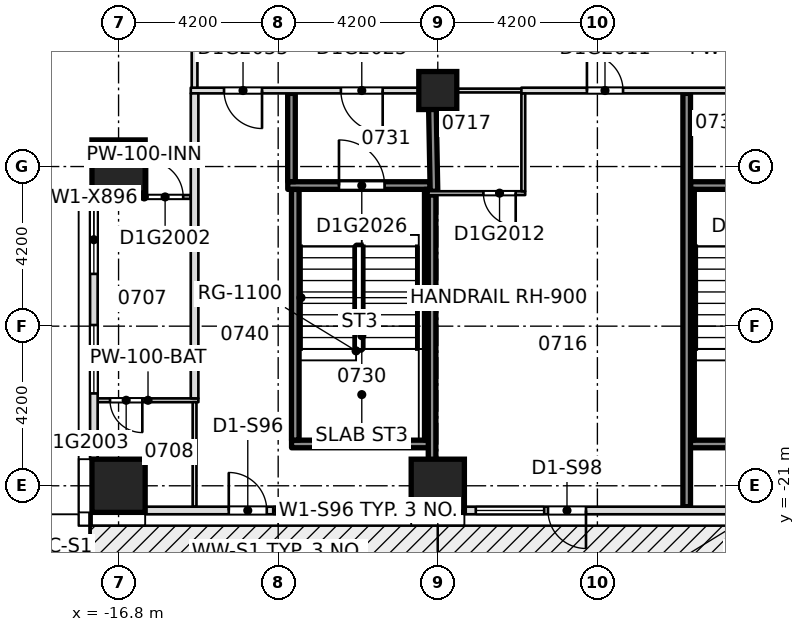
"""IFC4 building model, lengths in metres.
Left out: names, types, materials, properties, quantities, classifications, styles, units other than length and angle.
Written with IfcOpenShell. Run it as: python <this file> out.ifc"""

import sys

from ifc_helpers import new_model, si_unit, direction, frame, frame_2d, origin, origin_2d, place, context, subcontext, project, spatial, rectangle, extrude, element, fill, save


model = new_model("IFC4")
c1 = context("Model", 3, precision=1e-05, world=origin(), true_north=direction((0.0, 1.0)))
c2 = subcontext(c1, "Body", "Model", "MODEL_VIEW")
j1 = project(units=[si_unit("LENGTHUNIT", "METRE"), si_unit("PLANEANGLEUNIT", "RADIAN")], contexts=[c1])
p1 = place(None, origin())
s1 = spatial("IfcSite", under=j1, at=p1, CompositionType="ELEMENT")
p2 = place(p1, origin())
s2 = spatial("IfcBuilding", under=s1, at=p2, CompositionType="ELEMENT")
p3 = place(p2, frame((0.0, 0.0, 37.95)))
s3 = spatial("IfcBuildingStorey", under=s2, at=p3, CompositionType="ELEMENT", Elevation=37.95)
for number, where, z_axis, x_axis in (
    (1, (-16.8, -21.0, -0.32), (0.0, 0.0, 1.0), (1.0, 0.0, 0.0)),
    (2, (-8.4, -21.0, -0.32), (0.0, 0.0, 1.0), (1.0, 0.0, 0.0)),
    (3, (-16.8, -12.6, -0.32), (0.0, 0.0, 1.0), (1.0, 0.0, 0.0)),
):
    element("IfcColumn", number, at=place(p3, frame(where, z_axis=z_axis, x_axis=x_axis)), inside=s3, PredefinedType="COLUMN", context=c2, shape_type="SweptSolid", body=[
        extrude(rectangle(XDim=1.4, YDim=1.4, at=origin_2d()), origin(), (0.0, 0.0, 1.0), 3.45),
    ])
p4 = place(p3, frame((-8.4, -10.6, -0.32), z_axis=(0.0, 0.0, 1.0), x_axis=(1.0, 0.0, 0.0)))
e4 = element("IfcColumn", 4, at=p4, inside=s3, PredefinedType="COLUMN", context=c2, shape_type="SweptSolid", body=[
    extrude(rectangle(XDim=1.0, YDim=1.0, at=origin_2d()), origin(), (0.0, 0.0, 1.0), 3.45),
])
p5 = place(p3, frame((-12.248, -19.9, 0.0), z_axis=(0.0, 0.0, 1.0), x_axis=(1.0, 0.0, 0.0)))
e5 = element("IfcWall", 5, at=p5, inside=s3, PredefinedType="SOLIDWALL", context=c2, shape_type="SweptSolid", body=[
    extrude(rectangle(XDim=3.696, YDim=0.2, at=frame_2d((1.848, 0.0))), origin(), (0.0, 0.0, 1.0), 3.13),
])
p6 = place(p3, frame((-1.848, -19.9, 0.0), z_axis=(0.0, 0.0, 1.0), x_axis=(1.0, 0.0, 0.0)))
e6 = element("IfcWall", 6, at=p6, inside=s3, PredefinedType="SOLIDWALL", context=c2, shape_type="SweptSolid", body=[
    extrude(rectangle(XDim=3.696, YDim=0.2, at=frame_2d((1.848, 0.0))), origin(), (0.0, 0.0, 1.0), 3.13),
])
p7 = place(p3, frame((-17.35, -18.75, 0.0), z_axis=(0.0, 0.0, 1.0), x_axis=(1.0, 0.0, 0.0)))
e7 = element("IfcWall", 7, at=p7, inside=s3, PredefinedType="PARTITIONING", context=c2, shape_type="SweptSolid", body=[
    extrude(rectangle(XDim=2.65, YDim=0.1, at=frame_2d((1.325, 0.0))), origin(), (0.0, 0.0, 1.0), 3.13),
])
p8 = place(p7, frame((0.325, 0.0, 0.0)))
e8 = element("IfcOpeningElement", 8, at=p8, cuts=e7, PredefinedType="OPENING", context=c2, shape_type="SweptSolid", body=[
    extrude(rectangle(XDim=0.85, YDim=2.1, at=frame_2d((0.425, 1.05))), frame((0.0, 0.06, 0.0), z_axis=(0.0, -1.0, 0.0), x_axis=(1.0, 0.0, 0.0)), (0.0, 0.0, 1.0), 0.12),
])
p9 = place(p3, frame((-17.35, -13.4, 0.0), z_axis=(0.0, 0.0, 1.0), x_axis=(1.0, 0.0, 0.0)))
e9 = element("IfcWall", 9, at=p9, inside=s3, PredefinedType="PARTITIONING", context=c2, shape_type="SweptSolid", body=[
    extrude(rectangle(XDim=2.45, YDim=0.1, at=frame_2d((1.225, 0.0))), origin(), (0.0, 0.0, 1.0), 3.13),
])
p10 = place(p9, frame((1.3, 0.0, 0.0)))
e10 = element("IfcOpeningElement", 10, at=p10, cuts=e9, PredefinedType="OPENING", context=c2, shape_type="SweptSolid", body=[
    extrude(rectangle(XDim=0.95, YDim=2.1, at=frame_2d((0.475, 1.05))), frame((0.0, 0.06, 0.0), z_axis=(0.0, -1.0, 0.0), x_axis=(1.0, 0.0, 0.0)), (0.0, 0.0, 1.0), 0.12),
])
p11 = place(p3, frame((-8.65, -13.3, 0.0), z_axis=(0.0, 0.0, 1.0), x_axis=(1.0, 0.0, 0.0)))
e11 = element("IfcWall", 11, at=p11, inside=s3, PredefinedType="PARTITIONING", context=c2, shape_type="SweptSolid", body=[
    extrude(rectangle(XDim=2.55, YDim=0.1, at=frame_2d((1.275, 0.0))), origin(), (0.0, 0.0, 1.0), 3.13),
])
p12 = place(p11, frame((1.45, 0.0, 0.0)))
e12 = element("IfcOpeningElement", 12, at=p12, cuts=e11, PredefinedType="OPENING", context=c2, shape_type="SweptSolid", body=[
    extrude(rectangle(XDim=0.85, YDim=2.1, at=frame_2d((0.425, 1.05))), frame((0.0, 0.06, 0.0), z_axis=(0.0, -1.0, 0.0), x_axis=(1.0, 0.0, 0.0)), (0.0, 0.0, 1.0), 0.12),
])
p13 = place(p3, frame((-12.348, -13.1, 0.0), z_axis=(0.0, 0.0, 1.0), x_axis=(1.0, 0.0, 0.0)))
e13 = element("IfcWall", 13, at=p13, inside=s3, PredefinedType="SOLIDWALL", context=c2, shape_type="SweptSolid", body=[
    extrude(rectangle(XDim=3.746, YDim=0.2, at=frame_2d((1.873, 0.0))), origin(), (0.0, 0.0, 1.0), 3.13),
])
p14 = place(p13, frame((1.348, 0.0, 0.0)))
e14 = element("IfcOpeningElement", 14, at=p14, cuts=e13, PredefinedType="OPENING", context=c2, shape_type="SweptSolid", body=[
    extrude(rectangle(XDim=1.2, YDim=2.1, at=frame_2d((0.6, 1.05))), frame((0.0, 0.11, 0.0), z_axis=(0.0, -1.0, 0.0), x_axis=(1.0, 0.0, 0.0)), (0.0, 0.0, 1.0), 0.22),
])
p15 = place(p3, frame((-1.748, -13.1, 0.0), z_axis=(0.0, 0.0, 1.0), x_axis=(1.0, 0.0, 0.0)))
e15 = element("IfcWall", 15, at=p15, inside=s3, PredefinedType="SOLIDWALL", context=c2, shape_type="SweptSolid", body=[
    extrude(rectangle(XDim=3.696, YDim=0.2, at=frame_2d((1.848, 0.0))), origin(), (0.0, 0.0, 1.0), 3.13),
])
p16 = place(p15, frame((1.148, 0.0, 0.0)))
e16 = element("IfcOpeningElement", 16, at=p16, cuts=e15, PredefinedType="OPENING", context=c2, shape_type="SweptSolid", body=[
    extrude(rectangle(XDim=1.2, YDim=2.1, at=frame_2d((0.6, 1.05))), frame((0.0, 0.11, 0.0), z_axis=(0.0, -1.0, 0.0), x_axis=(1.0, 0.0, 0.0)), (0.0, 0.0, 1.0), 0.22),
])
p17 = place(p3, frame((-14.9, -10.6, 0.0), z_axis=(0.0, 0.0, 1.0), x_axis=(1.0, 0.0, 0.0)))
e17 = element("IfcWall", 17, at=p17, inside=s3, PredefinedType="PARTITIONING", context=c2, shape_type="SweptSolid", body=[
    extrude(rectangle(XDim=6.4, YDim=0.15, at=frame_2d((3.2, 0.0))), origin(), (0.0, 0.0, 1.0), 3.13),
])
p18 = place(p17, frame((3.95, 0.0, 0.0)))
e18 = element("IfcOpeningElement", 18, at=p18, cuts=e17, PredefinedType="OPENING", context=c2, shape_type="SweptSolid", body=[
    extrude(rectangle(XDim=1.1, YDim=2.1, at=frame_2d((0.55, 1.05))), frame((0.0, 0.085, 0.0), z_axis=(0.0, -1.0, 0.0), x_axis=(1.0, 0.0, 0.0)), (0.0, 0.0, 1.0), 0.17),
])
p19 = place(p17, frame((0.875, 0.0, 0.0)))
e19 = element("IfcOpeningElement", 19, at=p19, cuts=e17, PredefinedType="OPENING", context=c2, shape_type="SweptSolid", body=[
    extrude(rectangle(XDim=1.0, YDim=2.1, at=frame_2d((0.5, 1.05))), frame((0.0, 0.085, 0.0), z_axis=(0.0, -1.0, 0.0), x_axis=(1.0, 0.0, 0.0)), (0.0, 0.0, 1.0), 0.17),
])
p20 = place(p3, frame((-8.6, -10.6, 0.0), z_axis=(0.0, 0.0, 1.0), x_axis=(1.0, 0.0, 0.0)))
e20 = element("IfcWall", 20, at=p20, inside=s3, PredefinedType="PARTITIONING", context=c2, shape_type="SweptSolid", body=[
    extrude(rectangle(XDim=2.5, YDim=0.1, at=frame_2d((1.25, 0.0))), origin(), (0.0, 0.0, 1.0), 3.13),
])
p21 = place(p3, frame((-6.2, -10.6, 0.0), z_axis=(0.0, 0.0, 1.0), x_axis=(1.0, 0.0, 0.0)))
e21 = element("IfcWall", 21, at=p21, inside=s3, PredefinedType="PARTITIONING", context=c2, shape_type="SweptSolid", body=[
    extrude(rectangle(XDim=12.1, YDim=0.15, at=frame_2d((6.05, 0.0))), origin(), (0.0, 0.0, 1.0), 3.13),
])
p22 = place(p21, frame((1.725, 0.0, 0.0)))
e22 = element("IfcOpeningElement", 22, at=p22, cuts=e21, PredefinedType="OPENING", context=c2, shape_type="SweptSolid", body=[
    extrude(rectangle(XDim=0.95, YDim=2.1, at=frame_2d((0.475, 1.05))), frame((0.0, 0.085, 0.0), z_axis=(0.0, -1.0, 0.0), x_axis=(1.0, 0.0, 0.0)), (0.0, 0.0, 1.0), 0.17),
])
p23 = place(p21, frame((9.575, 0.0, 0.0)))
e23 = element("IfcOpeningElement", 23, at=p23, cuts=e21, PredefinedType="OPENING", context=c2, shape_type="SweptSolid", body=[
    extrude(rectangle(XDim=0.95, YDim=2.1, at=frame_2d((0.475, 1.05))), frame((0.0, 0.085, 0.0), z_axis=(0.0, -1.0, 0.0), x_axis=(1.0, 0.0, 0.0)), (0.0, 0.0, 1.0), 0.17),
])
p24 = place(p21, frame((6.8, 0.0, 0.0)))
e24 = element("IfcOpeningElement", 24, at=p24, cuts=e21, PredefinedType="OPENING", context=c2, shape_type="SweptSolid", body=[
    extrude(rectangle(XDim=1.1, YDim=2.1, at=frame_2d((0.55, 1.05))), frame((0.0, 0.085, 0.0), z_axis=(0.0, -1.0, 0.0), x_axis=(1.0, 0.0, 0.0)), (0.0, 0.0, 1.0), 0.17),
])
p25 = place(p3, frame((-14.8, -21.55, 0.0), z_axis=(0.0, 0.0, 1.0), x_axis=(0.0, 1.0, 0.0)))
e25 = element("IfcWall", 25, at=p25, inside=s3, PredefinedType="PARTITIONING", context=c2, shape_type="SweptSolid", body=[
    extrude(rectangle(XDim=2.75, YDim=0.1, at=frame_2d((1.375, 0.0))), origin(), (0.0, 0.0, 1.0), 3.13),
])
p26 = place(p3, frame((-14.8, -18.7, 0.0), z_axis=(0.0, 0.0, 1.0), x_axis=(0.0, 1.0, 0.0)))
e26 = element("IfcWall", 26, at=p26, inside=s3, PredefinedType="PARTITIONING", context=c2, shape_type="SweptSolid", body=[
    extrude(rectangle(XDim=8.025, YDim=0.2, at=frame_2d((4.012, 0.0))), origin(), (0.0, 0.0, 1.0), 3.13),
])
p27 = place(p3, frame((-14.8, -10.525, 0.0), z_axis=(0.0, 0.0, 1.0), x_axis=(0.0, 1.0, 0.0)))
e27 = element("IfcWall", 27, at=p27, inside=s3, PredefinedType="PARTITIONING", context=c2, shape_type="SweptSolid", body=[
    extrude(rectangle(XDim=2.05, YDim=0.15, at=frame_2d((1.025, 0.0))), origin(), (0.0, 0.0, 1.0), 3.13),
])
p28 = place(p3, frame((-12.25, -12.998, 0.0), z_axis=(0.0, 0.0, 1.0), x_axis=(0.0, 1.0, 0.0)))
e28 = element("IfcWall", 28, at=p28, inside=s3, PredefinedType="SOLIDWALL", context=c2, shape_type="SweptSolid", body=[
    extrude(rectangle(XDim=2.323, YDim=0.2, at=frame_2d((1.162, 0.0))), origin(), (0.0, 0.0, 1.0), 3.13),
])
for number, where, z_axis, x_axis in (
    (29, (-12.15, -19.798, 0.0), (0.0, 0.0, 1.0), (0.0, 1.0, 0.0)),
    (30, (-8.65, -19.798, 0.0), (0.0, 0.0, 1.0), (0.0, 1.0, 0.0)),
):
    element("IfcWall", number, at=place(p3, frame(where, z_axis=z_axis, x_axis=x_axis)), inside=s3, PredefinedType="SOLIDWALL", context=c2, shape_type="SweptSolid", body=[
        extrude(rectangle(XDim=6.596, YDim=0.2, at=frame_2d((3.298, 0.0))), origin(), (0.0, 0.0, 1.0), 3.13),
    ])
p29 = place(p3, frame((-8.5, -13.25, 0.0), z_axis=(0.0, 0.0, 1.0), x_axis=(-0.019062755699, 0.999818289163, 0.0)))
e31 = element("IfcWall", 31, at=p29, inside=s3, PredefinedType="SOLIDWALL", context=c2, shape_type="SweptSolid", body=[
    extrude(rectangle(XDim=2.625, YDim=0.2, at=frame_2d((1.313, 0.0))), origin(), (0.0, 0.0, 1.0), 3.13),
])
p30 = place(p3, frame((-6.15, -13.25, 0.0), z_axis=(0.0, 0.0, 1.0), x_axis=(0.0, 1.0, 0.0)))
e32 = element("IfcWall", 32, at=p30, inside=s3, PredefinedType="PARTITIONING", context=c2, shape_type="SweptSolid", body=[
    extrude(rectangle(XDim=2.575, YDim=0.1, at=frame_2d((1.288, 0.0))), origin(), (0.0, 0.0, 1.0), 3.13),
])
p31 = place(p3, frame((-1.75, -19.798, 0.0), z_axis=(0.0, 0.0, 1.0), x_axis=(0.0, 1.0, 0.0)))
e33 = element("IfcWall", 33, at=p31, inside=s3, PredefinedType="SOLIDWALL", context=c2, shape_type="SweptSolid", body=[
    extrude(rectangle(XDim=6.596, YDim=0.2, at=frame_2d((3.298, 0.0))), origin(), (0.0, 0.0, 1.0), 3.13),
])
p32 = place(p3, frame((-16.1, -21.65, 0.0), z_axis=(0.0, 0.0, 1.0), x_axis=(1.0, 0.0, 0.0)))
e34 = element("IfcWall", 34, at=p32, inside=s3, PredefinedType="STANDARD", context=c2, shape_type="SweptSolid", body=[
    extrude(rectangle(XDim=7.0, YDim=0.2, at=frame_2d((3.5, 0.0))), origin(), (0.0, 0.0, 1.0), 3.13),
])
p33 = place(p32, frame((3.37, 0.0, 0.2)))
e35 = element("IfcOpeningElement", 35, at=p33, cuts=e34, PredefinedType="OPENING", context=c2, shape_type="SweptSolid", body=[
    extrude(rectangle(XDim=1.8, YDim=2.65, at=frame_2d((0.9, 1.325))), frame((0.0, 0.11, 0.0), z_axis=(0.0, -1.0, 0.0), x_axis=(1.0, 0.0, 0.0)), (0.0, 0.0, 1.0), 0.22),
])
p34 = place(p32, frame((2.2, 0.0, 0.0)))
e36 = element("IfcOpeningElement", 36, at=p34, cuts=e34, PredefinedType="OPENING", context=c2, shape_type="SweptSolid", body=[
    extrude(rectangle(XDim=1.0, YDim=2.4, at=frame_2d((0.5, 1.2))), frame((0.0, 0.11, 0.0), z_axis=(0.0, -1.0, 0.0), x_axis=(1.0, 0.0, 0.0)), (0.0, 0.0, 1.0), 0.22),
])
p35 = place(p3, frame((-7.7, -21.65, 0.0), z_axis=(0.0, 0.0, 1.0), x_axis=(1.0, 0.0, 0.0)))
e37 = element("IfcWall", 37, at=p35, inside=s3, PredefinedType="STANDARD", context=c2, shape_type="SweptSolid", body=[
    extrude(rectangle(XDim=7.0, YDim=0.2, at=frame_2d((3.5, 0.0))), origin(), (0.0, 0.0, 1.0), 3.13),
])
p36 = place(p35, frame((0.3, 0.0, 0.2)))
e38 = element("IfcOpeningElement", 38, at=p36, cuts=e37, PredefinedType="OPENING", context=c2, shape_type="SweptSolid", body=[
    extrude(rectangle(XDim=1.8, YDim=2.65, at=frame_2d((0.9, 1.325))), frame((0.0, 0.11, 0.0), z_axis=(0.0, -1.0, 0.0), x_axis=(1.0, 0.0, 0.0)), (0.0, 0.0, 1.0), 0.22),
])
p37 = place(p35, frame((2.2, 0.0, 0.0)))
e39 = element("IfcOpeningElement", 39, at=p37, cuts=e37, PredefinedType="OPENING", context=c2, shape_type="SweptSolid", body=[
    extrude(rectangle(XDim=1.0, YDim=2.4, at=frame_2d((0.5, 1.2))), frame((0.0, 0.11, 0.0), z_axis=(0.0, -1.0, 0.0), x_axis=(1.0, 0.0, 0.0)), (0.0, 0.0, 1.0), 0.22),
])
p38 = place(p3, frame((-24.5, -13.25, 0.0), z_axis=(0.0, 0.0, 1.0), x_axis=(1.0, 0.0, 0.0)))
e40 = element("IfcWall", 40, at=p38, inside=s3, PredefinedType="STANDARD", context=c2, shape_type="SweptSolid", body=[
    extrude(rectangle(XDim=6.95, YDim=0.2, at=frame_2d((3.475, 0.0))), origin(), (0.0, 0.0, 1.0), 3.13),
])
p39 = place(p3, frame((-17.45, -13.35, 0.0), z_axis=(0.0, 0.0, 1.0), x_axis=(0.0, -1.0, 0.0)))
e41 = element("IfcWall", 41, at=p39, inside=s3, PredefinedType="STANDARD", context=c2, shape_type="SweptSolid", body=[
    extrude(rectangle(XDim=6.95, YDim=0.2, at=frame_2d((3.475, 0.0))), origin(), (0.0, 0.0, 1.0), 3.13),
])
p40 = place(p39, frame((3.42, 0.0, 0.2)))
e42 = element("IfcOpeningElement", 42, at=p40, cuts=e41, PredefinedType="OPENING", context=c2, shape_type="SweptSolid", body=[
    extrude(rectangle(XDim=1.8, YDim=2.65, at=frame_2d((0.9, 1.325))), frame((0.0, 0.11, 0.0), z_axis=(0.0, -1.0, 0.0), x_axis=(1.0, 0.0, 0.0)), (0.0, 0.0, 1.0), 0.22),
])
p41 = place(p39, frame((0.275, 0.0, 0.2)))
e43 = element("IfcOpeningElement", 43, at=p41, cuts=e41, PredefinedType="OPENING", context=c2, shape_type="SweptSolid", body=[
    extrude(rectangle(XDim=1.8, YDim=2.65, at=frame_2d((0.9, 1.325))), frame((0.0, 0.11, 0.0), z_axis=(0.0, -1.0, 0.0), x_axis=(1.0, 0.0, 0.0)), (0.0, 0.0, 1.0), 0.22),
])
p42 = place(p3, frame((-1.85, -21.55, 0.0), z_axis=(0.0, 0.0, 1.0), x_axis=(0.0, 1.0, 0.0)))
e44 = element("IfcWall", 44, at=p42, inside=s3, PredefinedType="SOLIDWALL", context=c2, shape_type="SweptSolid", body=[
    extrude(rectangle(XDim=10.875, YDim=0.2, at=frame_2d((5.438, 0.0))), origin(), (0.0, 0.0, 1.0), 3.13),
])
p43 = place(p3, frame((-8.55, -21.55, 0.0), z_axis=(0.0, 0.0, 1.0), x_axis=(0.0, 1.0, 0.0)))
e45 = element("IfcWall", 45, at=p43, inside=s3, PredefinedType="SOLIDWALL", context=c2, shape_type="SweptSolid", body=[
    extrude(rectangle(XDim=8.2, YDim=0.2, at=frame_2d((4.1, 0.0))), origin(), (0.0, 0.0, 1.0), 3.13),
])
p44 = place(p10, origin())
e46 = element("IfcDoor", 46, at=p44, inside=s3, OperationType="SINGLE_SWING_RIGHT", PredefinedType="DOOR", context=c2, shape_type="SweptSolid", body=[
    extrude(rectangle(XDim=0.95, YDim=2.1, at=frame_2d((0.475, 1.05))), frame((0.0, 0.025, 0.0), z_axis=(0.0, -1.0, 0.0), x_axis=(1.0, 0.0, 0.0)), (0.0, 0.0, 1.0), 0.05),
])
fill(e10, e46)
p45 = place(p8, origin())
e47 = element("IfcDoor", 47, at=p45, inside=s3, OperationType="SINGLE_SWING_RIGHT", PredefinedType="DOOR", context=c2, shape_type="SweptSolid", body=[
    extrude(rectangle(XDim=0.85, YDim=2.1, at=frame_2d((0.425, 1.05))), frame((0.0, 0.025, 0.0), z_axis=(0.0, -1.0, 0.0), x_axis=(1.0, 0.0, 0.0)), (0.0, 0.0, 1.0), 0.05),
])
fill(e8, e47)
p46 = place(p22, origin())
e48 = element("IfcDoor", 48, at=p46, inside=s3, OperationType="SINGLE_SWING_LEFT", PredefinedType="DOOR", context=c2, shape_type="SweptSolid", body=[
    extrude(rectangle(XDim=0.95, YDim=2.1, at=frame_2d((0.475, 1.05))), frame((0.0, 0.025, 0.0), z_axis=(0.0, -1.0, 0.0), x_axis=(1.0, 0.0, 0.0)), (0.0, 0.0, 1.0), 0.05),
])
fill(e22, e48)
p47 = place(p12, origin())
e49 = element("IfcDoor", 49, at=p47, inside=s3, OperationType="SINGLE_SWING_LEFT", PredefinedType="DOOR", context=c2, shape_type="SweptSolid", body=[
    extrude(rectangle(XDim=0.85, YDim=2.1, at=frame_2d((0.425, 1.05))), frame((0.0, 0.025, 0.0), z_axis=(0.0, -1.0, 0.0), x_axis=(1.0, 0.0, 0.0)), (0.0, 0.0, 1.0), 0.05),
])
fill(e12, e49)
p48 = place(p18, origin())
e50 = element("IfcDoor", 50, at=p48, inside=s3, OperationType="SINGLE_SWING_RIGHT", PredefinedType="DOOR", context=c2, shape_type="SweptSolid", body=[
    extrude(rectangle(XDim=1.1, YDim=2.1, at=frame_2d((0.55, 1.05))), frame((0.0, 0.025, 0.0), z_axis=(0.0, -1.0, 0.0), x_axis=(1.0, 0.0, 0.0)), (0.0, 0.0, 1.0), 0.05),
])
fill(e18, e50)
p49 = place(p14, origin())
e51 = element("IfcDoor", 51, at=p49, inside=s3, OperationType="SINGLE_SWING_RIGHT", PredefinedType="DOOR", context=c2, shape_type="SweptSolid", body=[
    extrude(rectangle(XDim=1.2, YDim=2.1, at=frame_2d((0.6, 1.05))), frame((0.0, 0.025, 0.0), z_axis=(0.0, -1.0, 0.0), x_axis=(1.0, 0.0, 0.0)), (0.0, 0.0, 1.0), 0.05),
])
fill(e14, e51)
p50 = place(p19, origin())
e52 = element("IfcDoor", 52, at=p50, inside=s3, OperationType="SINGLE_SWING_RIGHT", PredefinedType="DOOR", context=c2, shape_type="SweptSolid", body=[
    extrude(rectangle(XDim=1.0, YDim=2.1, at=frame_2d((0.5, 1.05))), frame((0.0, 0.025, 0.0), z_axis=(0.0, -1.0, 0.0), x_axis=(1.0, 0.0, 0.0)), (0.0, 0.0, 1.0), 0.05),
])
fill(e19, e52)
p51 = place(p33, origin())
e53 = element("IfcWindow", 53, at=p51, inside=s3, PartitioningType="SINGLE_PANEL", PredefinedType="WINDOW", context=c2, shape_type="SweptSolid", body=[
    extrude(rectangle(XDim=1.8, YDim=2.65, at=frame_2d((0.9, 1.325))), frame((0.0, 0.03, 0.0), z_axis=(0.0, -1.0, 0.0), x_axis=(1.0, 0.0, 0.0)), (0.0, 0.0, 1.0), 0.06),
])
fill(e35, e53)
p52 = place(p34, origin())
e54 = element("IfcDoor", 54, at=p52, inside=s3, OperationType="SINGLE_SWING_LEFT", PredefinedType="DOOR", context=c2, shape_type="SweptSolid", body=[
    extrude(rectangle(XDim=1.0, YDim=2.4, at=frame_2d((0.5, 1.2))), frame((0.0, 0.025, 0.0), z_axis=(0.0, -1.0, 0.0), x_axis=(1.0, 0.0, 0.0)), (0.0, 0.0, 1.0), 0.05),
])
fill(e36, e54)
p53 = place(p36, origin())
e55 = element("IfcWindow", 55, at=p53, inside=s3, PartitioningType="SINGLE_PANEL", PredefinedType="WINDOW", context=c2, shape_type="SweptSolid", body=[
    extrude(rectangle(XDim=1.8, YDim=2.65, at=frame_2d((0.9, 1.325))), frame((0.0, 0.03, 0.0), z_axis=(0.0, -1.0, 0.0), x_axis=(1.0, 0.0, 0.0)), (0.0, 0.0, 1.0), 0.06),
])
fill(e38, e55)
p54 = place(p37, origin())
e56 = element("IfcDoor", 56, at=p54, inside=s3, OperationType="SINGLE_SWING_LEFT", PredefinedType="DOOR", context=c2, shape_type="SweptSolid", body=[
    extrude(rectangle(XDim=1.0, YDim=2.4, at=frame_2d((0.5, 1.2))), frame((0.0, 0.025, 0.0), z_axis=(0.0, -1.0, 0.0), x_axis=(1.0, 0.0, 0.0)), (0.0, 0.0, 1.0), 0.05),
])
fill(e39, e56)
p55 = place(p40, origin())
e57 = element("IfcWindow", 57, at=p55, inside=s3, PartitioningType="SINGLE_PANEL", PredefinedType="WINDOW", context=c2, shape_type="SweptSolid", body=[
    extrude(rectangle(XDim=1.8, YDim=2.65, at=frame_2d((0.9, 1.325))), frame((0.0, 0.03, 0.0), z_axis=(0.0, -1.0, 0.0), x_axis=(1.0, 0.0, 0.0)), (0.0, 0.0, 1.0), 0.06),
])
fill(e42, e57)
p56 = place(p41, origin())
e58 = element("IfcWindow", 58, at=p56, inside=s3, PartitioningType="SINGLE_PANEL", PredefinedType="WINDOW", context=c2, shape_type="SweptSolid", body=[
    extrude(rectangle(XDim=1.8, YDim=2.65, at=frame_2d((0.9, 1.325))), frame((0.0, 0.03, 0.0), z_axis=(0.0, -1.0, 0.0), x_axis=(1.0, 0.0, 0.0)), (0.0, 0.0, 1.0), 0.06),
])
fill(e43, e58)
save(model, sys.argv[1])
